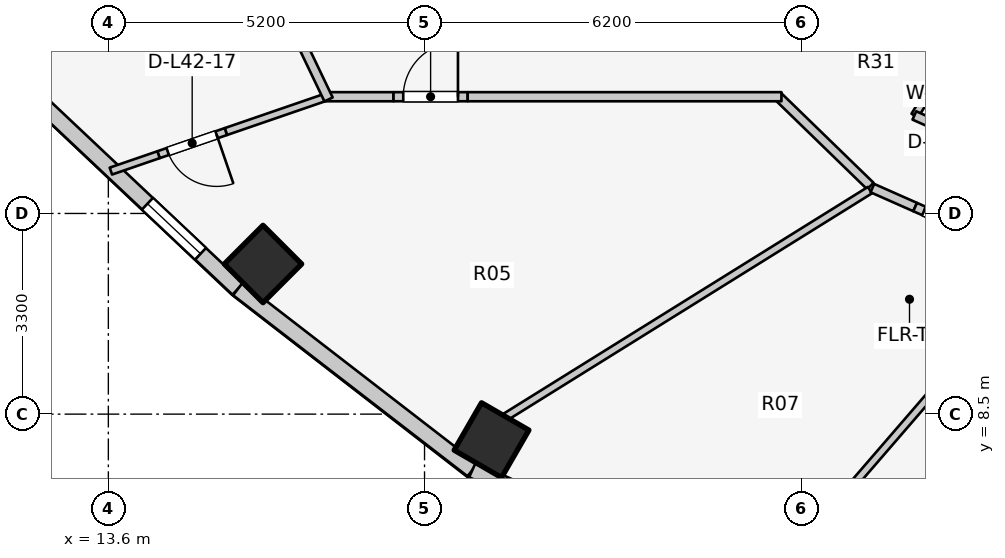
"""IFC4 building model, lengths in metres.
Left out: names, types, materials, properties, quantities, classifications, styles, units other than length and angle.
Written with IfcOpenShell. Run it as: python <this file> out.ifc"""

import sys

from ifc_helpers import new_model, si_unit, direction, frame, frame_2d, origin, origin_2d, place, context, subcontext, project, spatial, rectangle, extrude, element, fill, save


model = new_model("IFC4")
c1 = context("Model", 3, precision=1e-05, world=origin(), true_north=direction((0.0, 1.0)))
c2 = subcontext(c1, "Body", "Model", "MODEL_VIEW")
j1 = project(units=[si_unit("LENGTHUNIT", "METRE"), si_unit("PLANEANGLEUNIT", "RADIAN")], contexts=[c1])
p1 = place(None, origin())
s1 = spatial("IfcSite", under=j1, at=p1, CompositionType="ELEMENT")
p2 = place(p1, origin())
s2 = spatial("IfcBuilding", under=s1, at=p2, CompositionType="ELEMENT")
p3 = place(p2, frame((0.0, 0.0, 140.5)))
s3 = spatial("IfcBuildingStorey", under=s2, at=p3, CompositionType="ELEMENT", Elevation=140.5)
for number, where, z_axis, x_axis in (
    (1, (16.143, 10.969, 0.0), (0.0, 0.0, 1.0), (-0.707, -0.707, 0.0)),
    (2, (19.902, 8.072, 0.0), (0.0, 0.0, 1.0), (-0.5, -0.866, 0.0)),
):
    element("IfcColumn", number, at=place(p3, frame(where, z_axis=z_axis, x_axis=x_axis)), inside=s3, PredefinedType="COLUMN", context=c2, shape_type="SweptSolid", body=[
        extrude(rectangle(XDim=0.9, YDim=0.9, at=origin_2d()), origin(), (0.0, 0.0, 1.0), 3.1),
    ])
p4 = place(p3, frame((12.381, 13.716, 0.0), z_axis=(0.0, 0.0, 1.0), x_axis=(0.727667301037, -0.68593024354, 0.0)))
e3 = element("IfcWall", 3, at=p4, inside=s3, PredefinedType="STANDARD", context=c2, shape_type="SweptSolid", body=[
    extrude(rectangle(XDim=4.604, YDim=0.26, at=frame_2d((2.302, 0.0))), origin(), (0.0, 0.0, 1.0), 1.22),
])
p5 = place(p4, frame((2.56, 0.0, 0.15)))
e4 = element("IfcOpeningElement", 4, at=p5, cuts=e3, PredefinedType="OPENING", context=c2, shape_type="SweptSolid", body=[
    extrude(rectangle(XDim=1.2, YDim=0.9, at=frame_2d((0.6, 0.45))), frame((0.0, 0.14, 0.0), z_axis=(0.0, -1.0, 0.0), x_axis=(1.0, 0.0, 0.0)), (0.0, 0.0, 1.0), 0.28),
])
p6 = place(p3, frame((15.731, 10.559, 0.0), z_axis=(0.0, 0.0, 1.0), x_axis=(0.791460185804, -0.611220724687, 0.0)))
e5 = element("IfcWall", 5, at=p6, inside=s3, PredefinedType="STANDARD", context=c2, shape_type="SweptSolid", body=[
    extrude(rectangle(XDim=4.872, YDim=0.26, at=frame_2d((2.436, 0.0))), origin(), (0.0, 0.0, 1.0), 1.22),
])
p7 = place(p3, frame((19.587, 7.581, 0.0), z_axis=(0.0, 0.0, 1.0), x_axis=(0.912353637112, -0.409403029847, 0.0)))
e6 = element("IfcWall", 6, at=p7, inside=s3, PredefinedType="STANDARD", context=c2, shape_type="SweptSolid", body=[
    extrude(rectangle(XDim=5.533, YDim=0.26, at=frame_2d((2.766, 0.0))), origin(), (0.0, 0.0, 1.0), 1.22),
])
p8 = place(p7, frame((2.167, 0.0, 0.15)))
e7 = element("IfcOpeningElement", 7, at=p8, cuts=e6, PredefinedType="OPENING", context=c2, shape_type="SweptSolid", body=[
    extrude(rectangle(XDim=1.2, YDim=0.9, at=frame_2d((0.6, 0.45))), frame((0.0, 0.14, 0.0), z_axis=(0.0, -1.0, 0.0), x_axis=(1.0, 0.0, 0.0)), (0.0, 0.0, 1.0), 0.28),
])
p9 = place(p3, frame((17.247, 13.736, 0.0), z_axis=(0.0, 0.0, 1.0), x_axis=(-0.945652975294, -0.325177567366, 0.0)))
e8 = element("IfcWall", 8, at=p9, inside=s3, PredefinedType="MOVABLE", context=c2, shape_type="SweptSolid", body=[
    extrude(rectangle(XDim=1.814, YDim=0.12, at=frame_2d((0.907, 0.0))), origin(), (0.0, 0.0, 1.0), 1.22),
])
p10 = place(p3, frame((15.532, 13.146, 0.0), z_axis=(0.0, 0.0, 1.0), x_axis=(-0.945742719509, -0.324916463874, 0.0)))
e9 = element("IfcWall", 9, at=p10, inside=s3, PredefinedType="MOVABLE", context=c2, shape_type="SweptSolid", body=[
    extrude(rectangle(XDim=1.17, YDim=0.12, at=frame_2d((0.585, 0.0))), origin(), (0.0, 0.0, 1.0), 2.11),
])
p11 = place(p10, frame((0.16, 0.0, 0.0)))
e10 = element("IfcOpeningElement", 10, at=p11, cuts=e9, PredefinedType="OPENING", context=c2, shape_type="SweptSolid", body=[
    extrude(rectangle(XDim=0.85, YDim=2.05, at=frame_2d((0.425, 1.025))), frame((0.0, 0.07, 0.0), z_axis=(0.0, -1.0, 0.0), x_axis=(1.0, 0.0, 0.0)), (0.0, 0.0, 1.0), 0.14),
])
p12 = place(p3, frame((14.426, 12.766, 0.0), z_axis=(0.0, 0.0, 1.0), x_axis=(-0.945666792175, -0.325137383544, 0.0)))
e11 = element("IfcWall", 11, at=p12, inside=s3, PredefinedType="MOVABLE", context=c2, shape_type="SweptSolid", body=[
    extrude(rectangle(XDim=0.829, YDim=0.12, at=frame_2d((0.415, 0.0))), origin(), (0.0, 0.0, 1.0), 2.575),
])
p13 = place(p3, frame((26.133, 12.251, 0.0), z_axis=(0.0, 0.0, 1.0), x_axis=(-0.717419568599, 0.696641344302, 0.0)))
e12 = element("IfcWall", 12, at=p13, inside=s3, PredefinedType="PARTITIONING", context=c2, shape_type="SweptSolid", body=[
    extrude(rectangle(XDim=2.138, YDim=0.15, at=frame_2d((1.069, 0.0))), origin(), (0.0, 0.0, 1.0), 2.019),
])
p14 = place(p3, frame((17.15, 13.72, 0.0), z_axis=(0.0, 0.0, 1.0), x_axis=(1.0, 0.0, 0.0)))
e13 = element("IfcWall", 13, at=p14, inside=s3, PredefinedType="PARTITIONING", context=c2, shape_type="SweptSolid", body=[
    extrude(rectangle(XDim=1.14, YDim=0.15, at=frame_2d((0.57, 0.0))), origin(), (0.0, 0.0, 1.0), 2.575),
])
p15 = place(p3, frame((18.29, 13.72, 0.0), z_axis=(0.0, 0.0, 1.0), x_axis=(1.0, 0.0, 0.0)))
e14 = element("IfcWall", 14, at=p15, inside=s3, PredefinedType="PARTITIONING", context=c2, shape_type="SweptSolid", body=[
    extrude(rectangle(XDim=1.22, YDim=0.15, at=frame_2d((0.61, 0.0))), origin(), (0.0, 0.0, 1.0), 2.575),
])
p16 = place(p15, frame((0.16, 0.0, 0.0)))
e15 = element("IfcOpeningElement", 15, at=p16, cuts=e14, PredefinedType="OPENING", context=c2, shape_type="SweptSolid", body=[
    extrude(rectangle(XDim=0.9, YDim=2.1, at=frame_2d((0.45, 1.05))), frame((0.0, 0.085, 0.0), z_axis=(0.0, -1.0, 0.0), x_axis=(1.0, 0.0, 0.0)), (0.0, 0.0, 1.0), 0.17),
])
p17 = place(p3, frame((19.51, 13.72, 0.0), z_axis=(0.0, 0.0, 1.0), x_axis=(1.0, 0.0, 0.0)))
e16 = element("IfcWall", 16, at=p17, inside=s3, PredefinedType="PARTITIONING", context=c2, shape_type="SweptSolid", body=[
    extrude(rectangle(XDim=5.16, YDim=0.15, at=frame_2d((2.58, 0.0))), origin(), (0.0, 0.0, 1.0), 2.019),
])
p18 = place(p3, frame((17.222, 13.675, 0.0), z_axis=(0.0, 0.0, 1.0), x_axis=(-0.431973389813, 0.901886351207, 0.0)))
e17 = element("IfcWall", 17, at=p18, inside=s3, PredefinedType="PARTITIONING", context=c2, shape_type="SweptSolid", body=[
    extrude(rectangle(XDim=2.452, YDim=0.15, at=frame_2d((1.226, 0.0))), origin(), (0.0, 0.0, 1.0), 2.575),
])
p19 = place(p3, frame((28.45, 15.985, 0.0), z_axis=(0.0, 0.0, 1.0), x_axis=(-0.524565340045, -0.851370192116, 0.0)))
e18 = element("IfcWall", 18, at=p19, inside=s3, PredefinedType="PARTITIONING", context=c2, shape_type="SweptSolid", body=[
    extrude(rectangle(XDim=3.027, YDim=0.125, at=frame_2d((1.514, 0.0))), origin(), (0.0, 0.0, 1.0), 2.019),
])
p20 = place(p3, frame((26.856, 13.412, 0.0), z_axis=(0.0, 0.0, 1.0), x_axis=(0.912985265053, -0.407992531545, 0.0)))
e19 = element("IfcWall", 19, at=p20, inside=s3, PredefinedType="PARTITIONING", context=c2, shape_type="SweptSolid", body=[
    extrude(rectangle(XDim=2.723, YDim=0.15, at=frame_2d((1.362, 0.0))), origin(), (0.0, 0.0, 1.0), 2.019),
])
p21 = place(p3, frame((26.125, 12.184, 0.0), z_axis=(0.0, 0.0, 1.0), x_axis=(-0.849008457073, -0.528379257559, 0.0)))
e20 = element("IfcWall", 20, at=p21, inside=s3, PredefinedType="PARTITIONING", context=c2, shape_type="SweptSolid", body=[
    extrude(rectangle(XDim=7.077, YDim=0.125, at=frame_2d((3.539, 0.0))), origin(), (0.0, 0.0, 1.0), 1.22),
])
p22 = place(p3, frame((28.947, 10.927, 0.0), z_axis=(0.0, 0.0, 1.0), x_axis=(-0.653779283332, -0.756685303601, 0.0)))
e21 = element("IfcWall", 21, at=p22, inside=s3, PredefinedType="PARTITIONING", context=c2, shape_type="SweptSolid", body=[
    extrude(rectangle(XDim=6.14, YDim=0.125, at=frame_2d((3.07, 0.0))), origin(), (0.0, 0.0, 1.0), 1.22),
])
p23 = place(p3, frame((26.165, 12.217, 0.0), z_axis=(0.0, 0.0, 1.0), x_axis=(0.914386304715, -0.404842791401, 0.0)))
e22 = element("IfcWall", 22, at=p23, inside=s3, PredefinedType="PARTITIONING", context=c2, shape_type="SweptSolid", body=[
    extrude(rectangle(XDim=0.77, YDim=0.15, at=frame_2d((0.385, 0.0))), origin(), (0.0, 0.0, 1.0), 2.575),
])
p24 = place(p3, frame((26.869, 11.906, 0.0), z_axis=(0.0, 0.0, 1.0), x_axis=(0.914451103971, -0.404696402809, 0.0)))
e23 = element("IfcWall", 23, at=p24, inside=s3, PredefinedType="PARTITIONING", context=c2, shape_type="SweptSolid", body=[
    extrude(rectangle(XDim=1.32, YDim=0.15, at=frame_2d((0.66, 0.0))), origin(), (0.0, 0.0, 1.0), 2.16),
])
p25 = place(p24, frame((0.16, 0.0, 0.0)))
e24 = element("IfcOpeningElement", 24, at=p25, cuts=e23, PredefinedType="OPENING", context=c2, shape_type="SweptSolid", body=[
    extrude(rectangle(XDim=1.0, YDim=2.1, at=frame_2d((0.5, 1.05))), frame((0.0, 0.085, 0.0), z_axis=(0.0, -1.0, 0.0), x_axis=(1.0, 0.0, 0.0)), (0.0, 0.0, 1.0), 0.17),
])
p26 = place(p5, origin())
e25 = element("IfcWindow", 25, at=p26, inside=s3, PartitioningType="SINGLE_PANEL", PredefinedType="WINDOW", context=c2, shape_type="SweptSolid", body=[
    extrude(rectangle(XDim=1.2, YDim=0.9, at=frame_2d((0.6, 0.45))), frame((0.0, 0.03, 0.0), z_axis=(0.0, -1.0, 0.0), x_axis=(1.0, 0.0, 0.0)), (0.0, 0.0, 1.0), 0.06),
])
fill(e4, e25)
p27 = place(p11, origin())
e26 = element("IfcDoor", 26, at=p27, inside=s3, OperationType="SINGLE_SWING_LEFT", PredefinedType="DOOR", context=c2, shape_type="SweptSolid", body=[
    extrude(rectangle(XDim=0.85, YDim=2.05, at=frame_2d((0.425, 1.025))), frame((0.0, 0.025, 0.0), z_axis=(0.0, -1.0, 0.0), x_axis=(1.0, 0.0, 0.0)), (0.0, 0.0, 1.0), 0.05),
])
fill(e10, e26)
p28 = place(p16, origin())
e27 = element("IfcDoor", 27, at=p28, inside=s3, OperationType="SINGLE_SWING_RIGHT", PredefinedType="DOOR", context=c2, shape_type="SweptSolid", body=[
    extrude(rectangle(XDim=0.9, YDim=2.1, at=frame_2d((0.45, 1.05))), frame((0.0, 0.025, 0.0), z_axis=(0.0, -1.0, 0.0), x_axis=(1.0, 0.0, 0.0)), (0.0, 0.0, 1.0), 0.05),
])
fill(e15, e27)
p29 = place(p25, origin())
e28 = element("IfcDoor", 28, at=p29, inside=s3, OperationType="SINGLE_SWING_LEFT", PredefinedType="DOOR", context=c2, shape_type="SweptSolid", body=[
    extrude(rectangle(XDim=1.0, YDim=2.1, at=frame_2d((0.5, 1.05))), frame((0.0, 0.025, 0.0), z_axis=(0.0, -1.0, 0.0), x_axis=(1.0, 0.0, 0.0)), (0.0, 0.0, 1.0), 0.05),
])
fill(e24, e28)
save(model, sys.argv[1])
